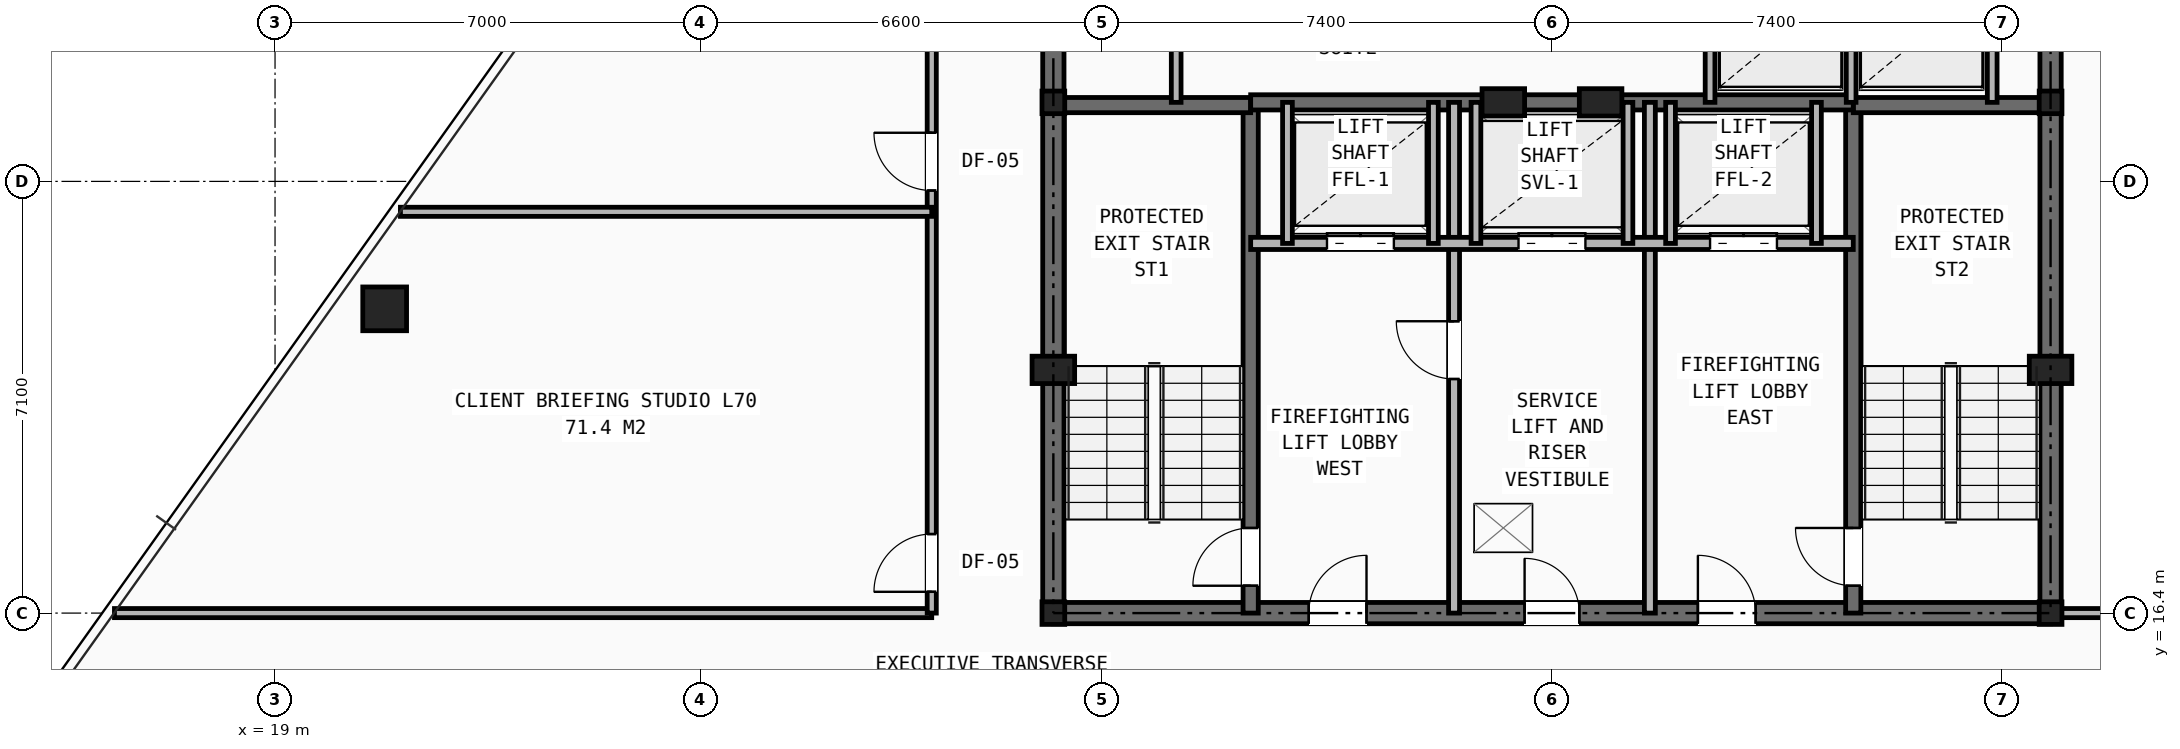
"""IFC4 building model, lengths in metres.
Left out: names, types, materials, properties, quantities, classifications, styles, units other than length and angle.
Written with IfcOpenShell. Run it as: python <this file> out.ifc"""

import sys

from ifc_helpers import new_model, si_unit, direction, frame, frame_2d, origin, origin_2d, place, context, subcontext, project, spatial, rectangle, hollow_rectangle, i_section, extrude, element, fill, save


model = new_model("IFC4")
c1 = context("Model", 3, precision=1e-05, world=origin(), true_north=direction((0.0, 1.0)))
c2 = subcontext(c1, "Body", "Model", "MODEL_VIEW")
j1 = project(units=[si_unit("LENGTHUNIT", "METRE"), si_unit("PLANEANGLEUNIT", "RADIAN")], contexts=[c1])
p1 = place(None, origin())
s1 = spatial("IfcSite", under=j1, at=p1, CompositionType="ELEMENT")
p2 = place(p1, origin())
s2 = spatial("IfcBuilding", under=s1, at=p2, CompositionType="ELEMENT")
p3 = place(p2, frame((0.0, 0.0, 246.9)))
s3 = spatial("IfcBuildingStorey", under=s2, at=p3, CompositionType="ELEMENT", Elevation=246.9)
for number, where, z_axis, x_axis in (
    (1, (31.8, 16.4, 0.0), (0.0, 0.0, 1.0), (1.0, 0.0, 0.0)),
    (2, (48.2, 16.4, 0.0), (0.0, 0.0, 1.0), (1.0, 0.0, 0.0)),
    (3, (31.8, 24.8, 0.0), (0.0, 0.0, 1.0), (1.0, 0.0, 0.0)),
    (4, (48.2, 24.8, 0.0), (0.0, 0.0, 1.0), (1.0, 0.0, 0.0)),
):
    element("IfcColumn", number, at=place(p3, frame(where, z_axis=z_axis, x_axis=x_axis)), inside=s3, PredefinedType="COLUMN", context=c2, shape_type="SweptSolid", body=[
        extrude(i_section(OverallWidth=0.374, OverallDepth=0.372, WebThickness=0.016, FlangeThickness=0.026, at=origin_2d()), origin(), (0.0, 0.0, 1.0), 3.5),
    ])
for number, where, z_axis, x_axis in (
    (5, (31.8, 20.4, 0.0), (0.0, 0.0, 1.0), (1.0, 0.0, 0.0)),
    (6, (48.2, 20.4, 0.0), (0.0, 0.0, 1.0), (1.0, 0.0, 0.0)),
    (7, (39.2, 24.8, 0.0), (0.0, 0.0, 1.0), (1.0, 0.0, 0.0)),
    (8, (40.8, 24.8, 0.0), (0.0, 0.0, 1.0), (1.0, 0.0, 0.0)),
):
    element("IfcColumn", number, at=place(p3, frame(where, z_axis=z_axis, x_axis=x_axis)), inside=s3, PredefinedType="PILASTER", context=c2, shape_type="SweptSolid", body=[
        extrude(rectangle(XDim=0.7, YDim=0.45, at=origin_2d()), origin(), (0.0, 0.0, 1.0), 3.5),
    ])
p4 = place(p3, frame((20.803, 21.404, 0.0), z_axis=(0.0, 0.0, 1.0), x_axis=(1.0, 0.0, 0.0)))
e9 = element("IfcColumn", 9, at=p4, inside=s3, PredefinedType="COLUMN", context=c2, shape_type="SweptSolid", body=[
    extrude(hollow_rectangle(XDim=0.72, YDim=0.72, WallThickness=0.05, at=origin_2d()), origin(), (0.0, 0.0, 1.0), 3.5),
])
p5 = place(p3, frame((31.8, 16.4, 0.0), z_axis=(0.0, 0.0, 1.0), x_axis=(1.0, 0.0, 0.0)))
e10 = element("IfcWall", 10, at=p5, inside=s3, PredefinedType="SHEAR", context=c2, shape_type="SweptSolid", body=[
    extrude(rectangle(XDim=16.4, YDim=0.35, at=frame_2d((8.2, 0.0))), origin(), (0.0, 0.0, 1.0), 3.2),
])
p6 = place(p5, frame((7.75, 0.0, 0.0)))
e11 = element("IfcOpeningElement", 11, at=p6, cuts=e10, PredefinedType="OPENING", context=c2, shape_type="SweptSolid", body=[
    extrude(rectangle(XDim=0.9, YDim=2.1, at=frame_2d((0.45, 1.05))), frame((0.0, 0.185, 0.0), z_axis=(0.0, -1.0, 0.0), x_axis=(1.0, 0.0, 0.0)), (0.0, 0.0, 1.0), 0.37),
])
p7 = place(p5, frame((4.2, 0.0, 0.0)))
e12 = element("IfcOpeningElement", 12, at=p7, cuts=e10, PredefinedType="OPENING", context=c2, shape_type="SweptSolid", body=[
    extrude(rectangle(XDim=0.95, YDim=2.1, at=frame_2d((0.475, 1.05))), frame((0.0, 0.185, 0.0), z_axis=(0.0, -1.0, 0.0), x_axis=(1.0, 0.0, 0.0)), (0.0, 0.0, 1.0), 0.37),
])
p8 = place(p5, frame((10.6, 0.0, 0.0)))
e13 = element("IfcOpeningElement", 13, at=p8, cuts=e10, PredefinedType="OPENING", context=c2, shape_type="SweptSolid", body=[
    extrude(rectangle(XDim=0.95, YDim=2.1, at=frame_2d((0.475, 1.05))), frame((0.0, 0.185, 0.0), z_axis=(0.0, -1.0, 0.0), x_axis=(1.0, 0.0, 0.0)), (0.0, 0.0, 1.0), 0.37),
])
p9 = place(p3, frame((31.8, 16.4, 0.0), z_axis=(0.0, 0.0, 1.0), x_axis=(0.0, 1.0, 0.0)))
e14 = element("IfcWall", 14, at=p9, inside=s3, PredefinedType="SHEAR", context=c2, shape_type="SweptSolid", body=[
    extrude(rectangle(XDim=14.8, YDim=0.35, at=frame_2d((7.4, 0.0))), origin(), (0.0, 0.0, 1.0), 3.2),
])
p10 = place(p9, frame((11.0, 0.0, 0.0)))
e15 = element("IfcOpeningElement", 15, at=p10, cuts=e14, PredefinedType="OPENING", context=c2, shape_type="SweptSolid", body=[
    extrude(rectangle(XDim=1.1, YDim=2.15, at=frame_2d((0.55, 1.075))), frame((0.0, 0.185, 0.0), z_axis=(0.0, -1.0, 0.0), x_axis=(1.0, 0.0, 0.0)), (0.0, 0.0, 1.0), 0.37),
])
p11 = place(p3, frame((48.2, 16.4, 0.0), z_axis=(0.0, 0.0, 1.0), x_axis=(0.0, 1.0, 0.0)))
e16 = element("IfcWall", 16, at=p11, inside=s3, PredefinedType="SHEAR", context=c2, shape_type="SweptSolid", body=[
    extrude(rectangle(XDim=14.8, YDim=0.35, at=frame_2d((7.4, 0.0))), origin(), (0.0, 0.0, 1.0), 3.2),
])
p12 = place(p11, frame((11.0, 0.0, 0.0)))
e17 = element("IfcOpeningElement", 17, at=p12, cuts=e16, PredefinedType="OPENING", context=c2, shape_type="SweptSolid", body=[
    extrude(rectangle(XDim=1.1, YDim=2.15, at=frame_2d((0.55, 1.075))), frame((0.0, 0.185, 0.0), z_axis=(0.0, -1.0, 0.0), x_axis=(1.0, 0.0, 0.0)), (0.0, 0.0, 1.0), 0.37),
])
p13 = place(p3, frame((35.045, 16.4, 0.0), z_axis=(0.0, 0.0, 1.0), x_axis=(0.0, 1.0, 0.0)))
e18 = element("IfcWall", 18, at=p13, inside=s3, PredefinedType="SHEAR", context=c2, shape_type="SweptSolid", body=[
    extrude(rectangle(XDim=8.4, YDim=0.25, at=frame_2d((4.2, 0.0))), origin(), (0.0, 0.0, 1.0), 3.2),
])
p14 = place(p13, frame((0.45, 0.0, 0.0)))
e19 = element("IfcOpeningElement", 19, at=p14, cuts=e18, PredefinedType="OPENING", context=c2, shape_type="SweptSolid", body=[
    extrude(rectangle(XDim=0.95, YDim=2.1, at=frame_2d((0.475, 1.05))), frame((0.0, 0.135, 0.0), z_axis=(0.0, -1.0, 0.0), x_axis=(1.0, 0.0, 0.0)), (0.0, 0.0, 1.0), 0.27),
])
p15 = place(p3, frame((31.8, 24.755, 0.0), z_axis=(0.0, 0.0, 1.0), x_axis=(1.0, 0.0, 0.0)))
e20 = element("IfcWall", 20, at=p15, inside=s3, PredefinedType="SHEAR", context=c2, shape_type="SweptSolid", body=[
    extrude(rectangle(XDim=3.245, YDim=0.25, at=frame_2d((1.623, 0.0))), origin(), (0.0, 0.0, 1.0), 3.2),
])
p16 = place(p3, frame((44.955, 16.4, 0.0), z_axis=(0.0, 0.0, 1.0), x_axis=(0.0, 1.0, 0.0)))
e21 = element("IfcWall", 21, at=p16, inside=s3, PredefinedType="SHEAR", context=c2, shape_type="SweptSolid", body=[
    extrude(rectangle(XDim=8.4, YDim=0.25, at=frame_2d((4.2, 0.0))), origin(), (0.0, 0.0, 1.0), 3.2),
])
p17 = place(p16, frame((0.45, 0.0, 0.0)))
e22 = element("IfcOpeningElement", 22, at=p17, cuts=e21, PredefinedType="OPENING", context=c2, shape_type="SweptSolid", body=[
    extrude(rectangle(XDim=0.95, YDim=2.1, at=frame_2d((0.475, 1.05))), frame((0.0, 0.135, 0.0), z_axis=(0.0, -1.0, 0.0), x_axis=(1.0, 0.0, 0.0)), (0.0, 0.0, 1.0), 0.27),
])
p18 = place(p3, frame((44.955, 24.755, 0.0), z_axis=(0.0, 0.0, 1.0), x_axis=(1.0, 0.0, 0.0)))
e23 = element("IfcWall", 23, at=p18, inside=s3, PredefinedType="SHEAR", context=c2, shape_type="SweptSolid", body=[
    extrude(rectangle(XDim=3.245, YDim=0.25, at=frame_2d((1.623, 0.0))), origin(), (0.0, 0.0, 1.0), 3.2),
])
p19 = place(p3, frame((35.045, 24.8, 0.0), z_axis=(0.0, 0.0, 1.0), x_axis=(1.0, 0.0, 0.0)))
e24 = element("IfcWall", 24, at=p19, inside=s3, PredefinedType="SHEAR", context=c2, shape_type="SweptSolid", body=[
    extrude(rectangle(XDim=9.91, YDim=0.25, at=frame_2d((4.955, 0.0))), origin(), (0.0, 0.0, 1.0), 3.2),
])
p20 = place(p3, frame((38.39, 16.4, 0.0), z_axis=(0.0, 0.0, 1.0), x_axis=(0.0, 1.0, 0.0)))
e25 = element("IfcWall", 25, at=p20, inside=s3, PredefinedType="PARTITIONING", context=c2, shape_type="SweptSolid", body=[
    extrude(rectangle(XDim=8.4, YDim=0.18, at=frame_2d((4.2, 0.0))), origin(), (0.0, 0.0, 1.0), 2.928),
])
p21 = place(p20, frame((3.85, 0.0, 0.0)))
e26 = element("IfcOpeningElement", 26, at=p21, cuts=e25, PredefinedType="OPENING", context=c2, shape_type="SweptSolid", body=[
    extrude(rectangle(XDim=0.95, YDim=2.1, at=frame_2d((0.475, 1.05))), frame((0.0, 0.1, 0.0), z_axis=(0.0, -1.0, 0.0), x_axis=(1.0, 0.0, 0.0)), (0.0, 0.0, 1.0), 0.2),
])
p22 = place(p3, frame((41.61, 16.4, 0.0), z_axis=(0.0, 0.0, 1.0), x_axis=(0.0, 1.0, 0.0)))
e27 = element("IfcWall", 27, at=p22, inside=s3, PredefinedType="PARTITIONING", context=c2, shape_type="SweptSolid", body=[
    extrude(rectangle(XDim=8.4, YDim=0.18, at=frame_2d((4.2, 0.0))), origin(), (0.0, 0.0, 1.0), 2.928),
])
p23 = place(p3, frame((35.045, 22.48, 0.0), z_axis=(0.0, 0.0, 1.0), x_axis=(1.0, 0.0, 0.0)))
e28 = element("IfcWall", 28, at=p23, inside=s3, PredefinedType="SOLIDWALL", context=c2, shape_type="SweptSolid", body=[
    extrude(rectangle(XDim=9.91, YDim=0.2, at=frame_2d((4.955, 0.0))), origin(), (0.0, 0.0, 1.0), 3.2),
])
p24 = place(p23, frame((1.255, 0.0, 0.0)))
e29 = element("IfcOpeningElement", 29, at=p24, cuts=e28, PredefinedType="OPENING", context=c2, shape_type="SweptSolid", body=[
    extrude(rectangle(XDim=1.1, YDim=2.15, at=frame_2d((0.55, 1.075))), frame((0.0, 0.11, 0.0), z_axis=(0.0, -1.0, 0.0), x_axis=(1.0, 0.0, 0.0)), (0.0, 0.0, 1.0), 0.22),
])
p25 = place(p23, frame((7.555, 0.0, 0.0)))
e30 = element("IfcOpeningElement", 30, at=p25, cuts=e28, PredefinedType="OPENING", context=c2, shape_type="SweptSolid", body=[
    extrude(rectangle(XDim=1.1, YDim=2.15, at=frame_2d((0.55, 1.075))), frame((0.0, 0.11, 0.0), z_axis=(0.0, -1.0, 0.0), x_axis=(1.0, 0.0, 0.0)), (0.0, 0.0, 1.0), 0.22),
])
p26 = place(p23, frame((4.405, 0.0, 0.0)))
e31 = element("IfcOpeningElement", 31, at=p26, cuts=e28, PredefinedType="OPENING", context=c2, shape_type="SweptSolid", body=[
    extrude(rectangle(XDim=1.1, YDim=2.15, at=frame_2d((0.55, 1.075))), frame((0.0, 0.11, 0.0), z_axis=(0.0, -1.0, 0.0), x_axis=(1.0, 0.0, 0.0)), (0.0, 0.0, 1.0), 0.22),
])
for number, where, z_axis, x_axis in (
    (32, (35.65, 22.48, 0.0), (0.0, 0.0, 1.0), (0.0, 1.0, 0.0)),
    (33, (38.05, 22.48, 0.0), (0.0, 0.0, 1.0), (0.0, 1.0, 0.0)),
    (34, (41.95, 22.48, 0.0), (0.0, 0.0, 1.0), (0.0, 1.0, 0.0)),
    (35, (44.35, 22.48, 0.0), (0.0, 0.0, 1.0), (0.0, 1.0, 0.0)),
    (36, (38.75, 22.48, 0.0), (0.0, 0.0, 1.0), (0.0, 1.0, 0.0)),
    (37, (41.25, 22.48, 0.0), (0.0, 0.0, 1.0), (0.0, 1.0, 0.0)),
):
    element("IfcWall", number, at=place(p3, frame(where, z_axis=z_axis, x_axis=x_axis)), inside=s3, PredefinedType="SOLIDWALL", context=c2, shape_type="SweptSolid", body=[
        extrude(rectangle(XDim=2.32, YDim=0.16, at=frame_2d((1.16, 0.0))), origin(), (0.0, 0.0, 1.0), 3.2),
    ])
for number, where, z_axis, x_axis in (
    (38, (33.82, 24.8, 0.0), (0.0, 0.0, 1.0), (0.0, 1.0, 0.0)),
    (39, (42.6, 24.8, 0.0), (0.0, 0.0, 1.0), (0.0, 1.0, 0.0)),
    (40, (44.92, 24.8, 0.0), (0.0, 0.0, 1.0), (0.0, 1.0, 0.0)),
    (41, (47.24, 24.8, 0.0), (0.0, 0.0, 1.0), (0.0, 1.0, 0.0)),
):
    element("IfcWall", number, at=place(p3, frame(where, z_axis=z_axis, x_axis=x_axis)), inside=s3, PredefinedType="SOLIDWALL", context=c2, shape_type="SweptSolid", body=[
        extrude(rectangle(XDim=2.08, YDim=0.16, at=frame_2d((1.04, 0.0))), origin(), (0.0, 0.0, 1.0), 3.2),
    ])
p27 = place(p3, frame((16.359, 16.4, 0.0), z_axis=(0.0, 0.0, 1.0), x_axis=(1.0, 0.0, 0.0)))
e42 = element("IfcWall", 42, at=p27, inside=s3, PredefinedType="PARTITIONING", context=c2, shape_type="SweptSolid", body=[
    extrude(rectangle(XDim=13.441, YDim=0.15, at=frame_2d((6.72, 0.0))), origin(), (0.0, 0.0, 1.0), 2.215),
])
p28 = place(p3, frame((48.2, 16.4, 0.0), z_axis=(0.0, 0.0, 1.0), x_axis=(1.0, 0.0, 0.0)))
e43 = element("IfcWall", 43, at=p28, inside=s3, PredefinedType="PARTITIONING", context=c2, shape_type="SweptSolid", body=[
    extrude(rectangle(XDim=15.441, YDim=0.15, at=frame_2d((7.72, 0.0))), origin(), (0.0, 0.0, 1.0), 2.215),
])
p29 = place(p3, frame((29.8, 16.4, 0.0), z_axis=(0.0, 0.0, 1.0), x_axis=(0.0, 1.0, 0.0)))
e44 = element("IfcWall", 44, at=p29, inside=s3, PredefinedType="PARTITIONING", context=c2, shape_type="SweptSolid", body=[
    extrude(rectangle(XDim=19.3, YDim=0.15, at=frame_2d((9.65, 0.0))), origin(), (0.0, 0.0, 1.0), 2.215),
])
p30 = place(p29, frame((0.35, 0.0, 0.0)))
e45 = element("IfcOpeningElement", 45, at=p30, cuts=e44, PredefinedType="OPENING", context=c2, shape_type="SweptSolid", body=[
    extrude(rectangle(XDim=0.95, YDim=2.1, at=frame_2d((0.475, 1.05))), frame((0.0, 0.085, 0.0), z_axis=(0.0, -1.0, 0.0), x_axis=(1.0, 0.0, 0.0)), (0.0, 0.0, 1.0), 0.17),
])
p31 = place(p29, frame((6.95, 0.0, 0.0)))
e46 = element("IfcOpeningElement", 46, at=p31, cuts=e44, PredefinedType="OPENING", context=c2, shape_type="SweptSolid", body=[
    extrude(rectangle(XDim=0.95, YDim=2.1, at=frame_2d((0.475, 1.05))), frame((0.0, 0.085, 0.0), z_axis=(0.0, -1.0, 0.0), x_axis=(1.0, 0.0, 0.0)), (0.0, 0.0, 1.0), 0.17),
])
p32 = place(p29, frame((13.75, 0.0, 0.0)))
e47 = element("IfcOpeningElement", 47, at=p32, cuts=e44, PredefinedType="OPENING", context=c2, shape_type="SweptSolid", body=[
    extrude(rectangle(XDim=0.95, YDim=2.1, at=frame_2d((0.475, 1.05))), frame((0.0, 0.085, 0.0), z_axis=(0.0, -1.0, 0.0), x_axis=(1.0, 0.0, 0.0)), (0.0, 0.0, 1.0), 0.17),
])
p33 = place(p3, frame((21.062, 23.0, 0.0), z_axis=(0.0, 0.0, 1.0), x_axis=(1.0, 0.0, 0.0)))
e48 = element("IfcWall", 48, at=p33, inside=s3, PredefinedType="PARTITIONING", context=c2, shape_type="SweptSolid", body=[
    extrude(rectangle(XDim=8.738, YDim=0.15, at=frame_2d((4.369, 0.0))), origin(), (0.0, 0.0, 1.0), 2.578),
])
p34 = place(p6, origin())
e49 = element("IfcDoor", 49, at=p34, inside=s3, OperationType="SINGLE_SWING_LEFT", PredefinedType="DOOR", context=c2, shape_type="SweptSolid", body=[
    extrude(rectangle(XDim=0.9, YDim=2.1, at=frame_2d((0.45, 1.05))), frame((0.0, 0.025, 0.0), z_axis=(0.0, -1.0, 0.0), x_axis=(1.0, 0.0, 0.0)), (0.0, 0.0, 1.0), 0.05),
])
fill(e11, e49)
p35 = place(p21, origin())
e50 = element("IfcDoor", 50, at=p35, inside=s3, OperationType="SINGLE_SWING_RIGHT", PredefinedType="DOOR", context=c2, shape_type="SweptSolid", body=[
    extrude(rectangle(XDim=0.95, YDim=2.1, at=frame_2d((0.475, 1.05))), frame((0.0, 0.025, 0.0), z_axis=(0.0, -1.0, 0.0), x_axis=(1.0, 0.0, 0.0)), (0.0, 0.0, 1.0), 0.05),
])
fill(e26, e50)
p36 = place(p14, origin())
e51 = element("IfcDoor", 51, at=p36, inside=s3, OperationType="SINGLE_SWING_LEFT", PredefinedType="DOOR", context=c2, shape_type="SweptSolid", body=[
    extrude(rectangle(XDim=0.95, YDim=2.1, at=frame_2d((0.475, 1.05))), frame((0.0, 0.025, 0.0), z_axis=(0.0, -1.0, 0.0), x_axis=(1.0, 0.0, 0.0)), (0.0, 0.0, 1.0), 0.05),
])
fill(e19, e51)
p37 = place(p17, origin())
e52 = element("IfcDoor", 52, at=p37, inside=s3, OperationType="SINGLE_SWING_RIGHT", PredefinedType="DOOR", context=c2, shape_type="SweptSolid", body=[
    extrude(rectangle(XDim=0.95, YDim=2.1, at=frame_2d((0.475, 1.05))), frame((0.0, 0.025, 0.0), z_axis=(0.0, -1.0, 0.0), x_axis=(1.0, 0.0, 0.0)), (0.0, 0.0, 1.0), 0.05),
])
fill(e22, e52)
p38 = place(p7, origin())
e53 = element("IfcDoor", 53, at=p38, inside=s3, OperationType="SINGLE_SWING_RIGHT", PredefinedType="DOOR", context=c2, shape_type="SweptSolid", body=[
    extrude(rectangle(XDim=0.95, YDim=2.1, at=frame_2d((0.475, 1.05))), frame((0.0, 0.025, 0.0), z_axis=(0.0, -1.0, 0.0), x_axis=(1.0, 0.0, 0.0)), (0.0, 0.0, 1.0), 0.05),
])
fill(e12, e53)
p39 = place(p8, origin())
e54 = element("IfcDoor", 54, at=p39, inside=s3, OperationType="SINGLE_SWING_LEFT", PredefinedType="DOOR", context=c2, shape_type="SweptSolid", body=[
    extrude(rectangle(XDim=0.95, YDim=2.1, at=frame_2d((0.475, 1.05))), frame((0.0, 0.025, 0.0), z_axis=(0.0, -1.0, 0.0), x_axis=(1.0, 0.0, 0.0)), (0.0, 0.0, 1.0), 0.05),
])
fill(e13, e54)
p40 = place(p24, origin())
e55 = element("IfcDoor", 55, at=p40, inside=s3, OperationType="DOUBLE_DOOR_SLIDING", PredefinedType="DOOR", context=c2, shape_type="SweptSolid", body=[
    extrude(rectangle(XDim=1.1, YDim=2.15, at=frame_2d((0.55, 1.075))), frame((0.0, 0.025, 0.0), z_axis=(0.0, -1.0, 0.0), x_axis=(1.0, 0.0, 0.0)), (0.0, 0.0, 1.0), 0.05),
])
fill(e29, e55)
p41 = place(p25, origin())
e56 = element("IfcDoor", 56, at=p41, inside=s3, OperationType="DOUBLE_DOOR_SLIDING", PredefinedType="DOOR", context=c2, shape_type="SweptSolid", body=[
    extrude(rectangle(XDim=1.1, YDim=2.15, at=frame_2d((0.55, 1.075))), frame((0.0, 0.025, 0.0), z_axis=(0.0, -1.0, 0.0), x_axis=(1.0, 0.0, 0.0)), (0.0, 0.0, 1.0), 0.05),
])
fill(e30, e56)
p42 = place(p26, origin())
e57 = element("IfcDoor", 57, at=p42, inside=s3, OperationType="DOUBLE_DOOR_SLIDING", PredefinedType="DOOR", context=c2, shape_type="SweptSolid", body=[
    extrude(rectangle(XDim=1.1, YDim=2.15, at=frame_2d((0.55, 1.075))), frame((0.0, 0.025, 0.0), z_axis=(0.0, -1.0, 0.0), x_axis=(1.0, 0.0, 0.0)), (0.0, 0.0, 1.0), 0.05),
])
fill(e31, e57)
p43 = place(p30, origin())
e58 = element("IfcDoor", 58, at=p43, inside=s3, OperationType="SINGLE_SWING_LEFT", PredefinedType="DOOR", context=c2, shape_type="SweptSolid", body=[
    extrude(rectangle(XDim=0.95, YDim=2.1, at=frame_2d((0.475, 1.05))), frame((0.0, 0.025, 0.0), z_axis=(0.0, -1.0, 0.0), x_axis=(1.0, 0.0, 0.0)), (0.0, 0.0, 1.0), 0.05),
])
fill(e45, e58)
p44 = place(p31, origin())
e59 = element("IfcDoor", 59, at=p44, inside=s3, OperationType="SINGLE_SWING_RIGHT", PredefinedType="DOOR", context=c2, shape_type="SweptSolid", body=[
    extrude(rectangle(XDim=0.95, YDim=2.1, at=frame_2d((0.475, 1.05))), frame((0.0, 0.025, 0.0), z_axis=(0.0, -1.0, 0.0), x_axis=(1.0, 0.0, 0.0)), (0.0, 0.0, 1.0), 0.05),
])
fill(e46, e59)
save(model, sys.argv[1])
